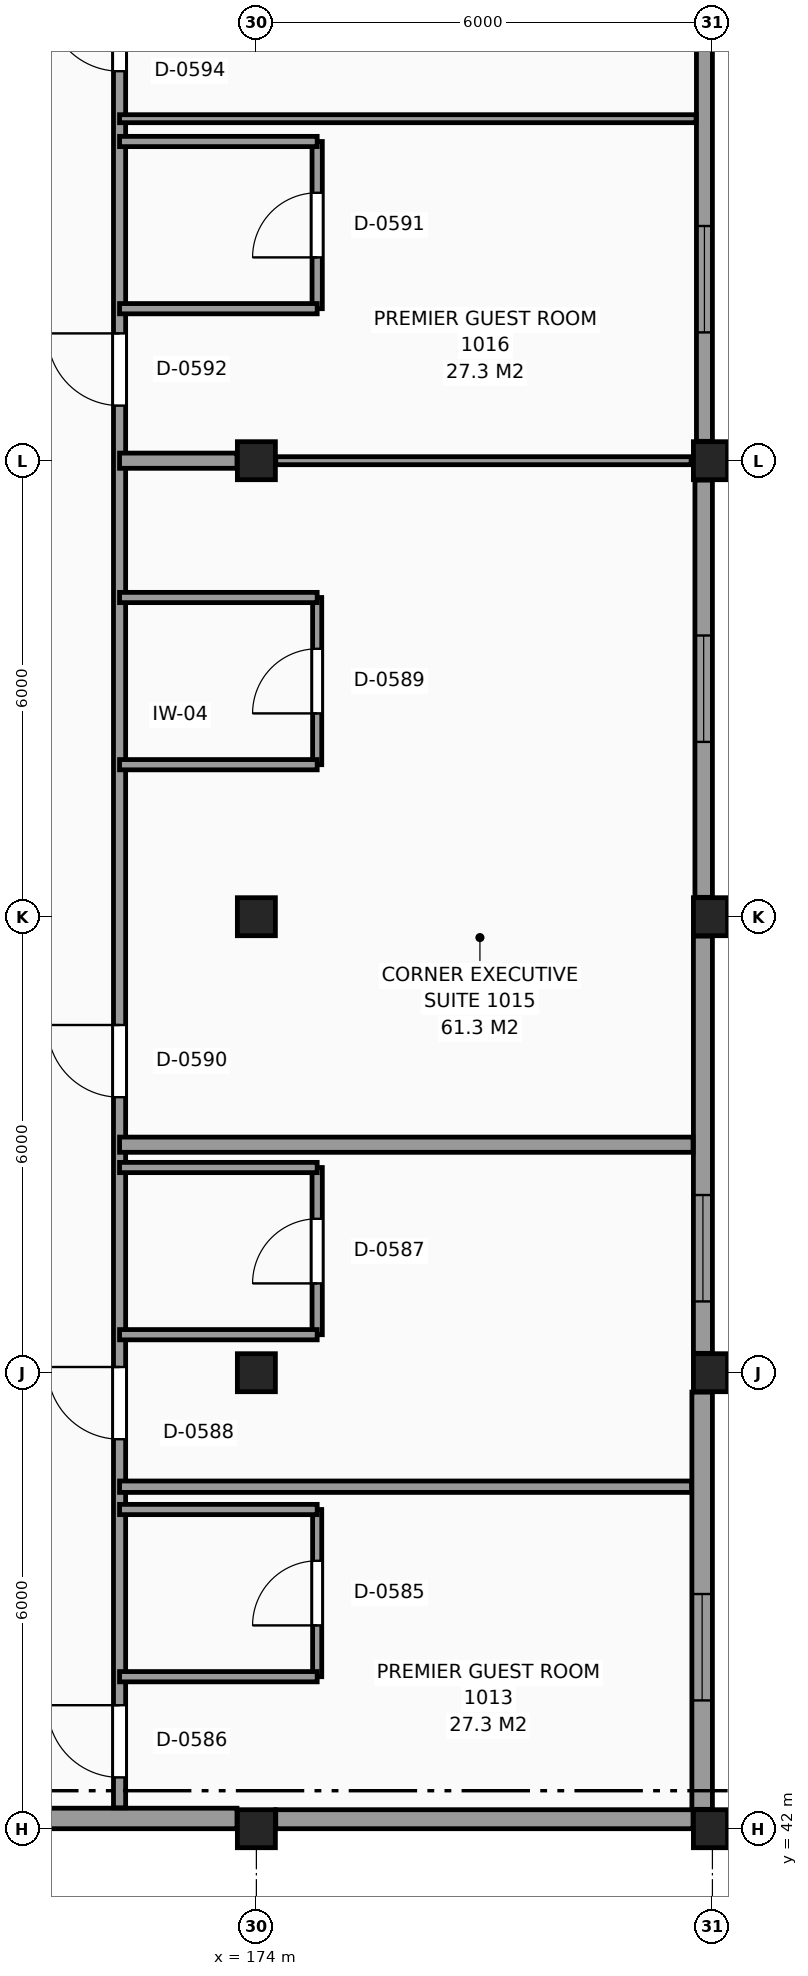
"""IFC4 building model, lengths in metres.
Left out: names, types, materials, properties, quantities, classifications, styles, units other than length and angle.
Written with IfcOpenShell. Run it as: python <this file> out.ifc"""

import sys

from ifc_helpers import new_model, si_unit, direction, frame, frame_2d, origin, origin_2d, place, context, subcontext, project, spatial, rectangle, extrude, element, fill, save


model = new_model("IFC4")
c1 = context("Model", 3, precision=1e-05, world=origin(), true_north=direction((0.0, 1.0)))
c2 = subcontext(c1, "Body", "Model", "MODEL_VIEW")
j1 = project(units=[si_unit("LENGTHUNIT", "METRE"), si_unit("PLANEANGLEUNIT", "RADIAN")], contexts=[c1])
p1 = place(None, origin())
s1 = spatial("IfcSite", under=j1, at=p1, CompositionType="ELEMENT")
p2 = place(p1, origin())
s2 = spatial("IfcBuilding", under=s1, at=p2, CompositionType="ELEMENT")
p3 = place(p2, frame((0.0, 0.0, 41.4)))
s3 = spatial("IfcBuildingStorey", under=s2, at=p3, CompositionType="ELEMENT", Elevation=41.4)
for number, where, z_axis, x_axis in (
    (1, (174.0, 42.0, 0.0), (0.0, 0.0, 1.0), (1.0, 0.0, 0.0)),
    (2, (174.0, 48.0, 0.0), (0.0, 0.0, 1.0), (1.0, 0.0, 0.0)),
    (3, (174.0, 54.0, 0.0), (0.0, 0.0, 1.0), (1.0, 0.0, 0.0)),
    (4, (174.0, 60.0, 0.0), (0.0, 0.0, 1.0), (1.0, 0.0, 0.0)),
    (5, (180.0, 42.0, 0.0), (0.0, 0.0, 1.0), (1.0, 0.0, 0.0)),
    (6, (180.0, 48.0, 0.0), (0.0, 0.0, 1.0), (1.0, 0.0, 0.0)),
    (7, (180.0, 54.0, 0.0), (0.0, 0.0, 1.0), (1.0, 0.0, 0.0)),
    (8, (180.0, 60.0, 0.0), (0.0, 0.0, 1.0), (1.0, 0.0, 0.0)),
):
    element("IfcColumn", number, at=place(p3, frame(where, z_axis=z_axis, x_axis=x_axis)), inside=s3, PredefinedType="COLUMN", context=c2, shape_type="SweptSolid", body=[
        extrude(rectangle(XDim=0.5, YDim=0.5, at=origin_2d()), origin(), (0.0, 0.0, 1.0), 3.3),
    ])
p4 = place(p3, frame((179.865, 42.255, 0.0), z_axis=(0.0, 0.0, 1.0), x_axis=(0.0, 1.0, 0.0)))
e9 = element("IfcWall", 9, at=p4, inside=s3, PredefinedType="SOLIDWALL", context=c2, shape_type="SweptSolid", body=[
    extrude(rectangle(XDim=5.49, YDim=0.27, at=frame_2d((2.745, 0.0))), origin(), (0.0, 0.0, 1.0), 2.445),
])
p5 = place(p4, frame((1.433, 0.0, 0.8)))
e10 = element("IfcOpeningElement", 10, at=p5, cuts=e9, PredefinedType="OPENING", context=c2, shape_type="SweptSolid", body=[
    extrude(rectangle(XDim=1.4, YDim=1.4, at=frame_2d((0.7, 0.7))), frame((0.0, 0.145, 0.0), z_axis=(0.0, -1.0, 0.0), x_axis=(1.0, 0.0, 0.0)), (0.0, 0.0, 1.0), 0.29),
])
p6 = place(p3, frame((179.875, 48.255, 0.0), z_axis=(0.0, 0.0, 1.0), x_axis=(0.0, 1.0, 0.0)))
e11 = element("IfcWall", 11, at=p6, inside=s3, PredefinedType="SOLIDWALL", context=c2, shape_type="SweptSolid", body=[
    extrude(rectangle(XDim=5.49, YDim=0.25, at=frame_2d((2.745, 0.0))), origin(), (0.0, 0.0, 1.0), 2.445),
])
p7 = place(p6, frame((0.683, 0.0, 0.8)))
e12 = element("IfcOpeningElement", 12, at=p7, cuts=e11, PredefinedType="OPENING", context=c2, shape_type="SweptSolid", body=[
    extrude(rectangle(XDim=1.4, YDim=1.4, at=frame_2d((0.7, 0.7))), frame((0.0, 0.135, 0.0), z_axis=(0.0, -1.0, 0.0), x_axis=(1.0, 0.0, 0.0)), (0.0, 0.0, 1.0), 0.27),
])
p8 = place(p3, frame((179.885, 54.255, 0.0), z_axis=(0.0, 0.0, 1.0), x_axis=(0.0, 1.0, 0.0)))
e13 = element("IfcWall", 13, at=p8, inside=s3, PredefinedType="SOLIDWALL", context=c2, shape_type="SweptSolid", body=[
    extrude(rectangle(XDim=5.49, YDim=0.23, at=frame_2d((2.745, 0.0))), origin(), (0.0, 0.0, 1.0), 2.445),
])
p9 = place(p8, frame((2.045, 0.0, 0.8)))
e14 = element("IfcOpeningElement", 14, at=p9, cuts=e13, PredefinedType="OPENING", context=c2, shape_type="SweptSolid", body=[
    extrude(rectangle(XDim=1.4, YDim=1.4, at=frame_2d((0.7, 0.7))), frame((0.0, 0.125, 0.0), z_axis=(0.0, -1.0, 0.0), x_axis=(1.0, 0.0, 0.0)), (0.0, 0.0, 1.0), 0.25),
])
p10 = place(p3, frame((179.895, 60.255, 0.0), z_axis=(0.0, 0.0, 1.0), x_axis=(0.0, 1.0, 0.0)))
e15 = element("IfcWall", 15, at=p10, inside=s3, PredefinedType="SOLIDWALL", context=c2, shape_type="SweptSolid", body=[
    extrude(rectangle(XDim=5.49, YDim=0.21, at=frame_2d((2.745, 0.0))), origin(), (0.0, 0.0, 1.0), 2.445),
])
p11 = place(p10, frame((1.433, 0.0, 0.8)))
e16 = element("IfcOpeningElement", 16, at=p11, cuts=e15, PredefinedType="OPENING", context=c2, shape_type="SweptSolid", body=[
    extrude(rectangle(XDim=1.4, YDim=1.4, at=frame_2d((0.7, 0.7))), frame((0.0, 0.115, 0.0), z_axis=(0.0, -1.0, 0.0), x_axis=(1.0, 0.0, 0.0)), (0.0, 0.0, 1.0), 0.23),
])
p12 = place(p3, frame((168.255, 42.135, 0.0), z_axis=(0.0, 0.0, 1.0), x_axis=(1.0, 0.0, 0.0)))
e17 = element("IfcWall", 17, at=p12, inside=s3, PredefinedType="SOLIDWALL", context=c2, shape_type="SweptSolid", body=[
    extrude(rectangle(XDim=5.49, YDim=0.27, at=frame_2d((2.745, 0.0))), origin(), (0.0, 0.0, 1.0), 2.295),
])
p13 = place(p3, frame((174.255, 42.125, 0.0), z_axis=(0.0, 0.0, 1.0), x_axis=(1.0, 0.0, 0.0)))
e18 = element("IfcWall", 18, at=p13, inside=s3, PredefinedType="SOLIDWALL", context=c2, shape_type="SweptSolid", body=[
    extrude(rectangle(XDim=5.49, YDim=0.25, at=frame_2d((2.745, 0.0))), origin(), (0.0, 0.0, 1.0), 2.295),
])
p14 = place(p3, frame((172.2, 42.275, 0.0), z_axis=(0.0, 0.0, 1.0), x_axis=(0.0, 1.0, 0.0)))
e19 = element("IfcWall", 19, at=p14, inside=s3, PredefinedType="PARTITIONING", context=c2, shape_type="SweptSolid", body=[
    extrude(rectangle(XDim=65.545, YDim=0.16, at=frame_2d((32.772, 0.0))), origin(), (0.0, 0.0, 1.0), 3.06),
])
p15 = place(p14, frame((0.4, 0.0, 0.0)))
e20 = element("IfcOpeningElement", 20, at=p15, cuts=e19, PredefinedType="OPENING", context=c2, shape_type="SweptSolid", body=[
    extrude(rectangle(XDim=0.95, YDim=2.1, at=frame_2d((0.475, 1.05))), frame((0.0, 0.09, 0.0), z_axis=(0.0, -1.0, 0.0), x_axis=(1.0, 0.0, 0.0)), (0.0, 0.0, 1.0), 0.18),
])
p16 = place(p14, frame((4.85, 0.0, 0.0)))
e21 = element("IfcOpeningElement", 21, at=p16, cuts=e19, PredefinedType="OPENING", context=c2, shape_type="SweptSolid", body=[
    extrude(rectangle(XDim=0.95, YDim=2.1, at=frame_2d((0.475, 1.05))), frame((0.0, 0.09, 0.0), z_axis=(0.0, -1.0, 0.0), x_axis=(1.0, 0.0, 0.0)), (0.0, 0.0, 1.0), 0.18),
])
p17 = place(p14, frame((9.35, 0.0, 0.0)))
e22 = element("IfcOpeningElement", 22, at=p17, cuts=e19, PredefinedType="OPENING", context=c2, shape_type="SweptSolid", body=[
    extrude(rectangle(XDim=0.95, YDim=2.1, at=frame_2d((0.475, 1.05))), frame((0.0, 0.09, 0.0), z_axis=(0.0, -1.0, 0.0), x_axis=(1.0, 0.0, 0.0)), (0.0, 0.0, 1.0), 0.18),
])
p18 = place(p14, frame((18.45, 0.0, 0.0)))
e23 = element("IfcOpeningElement", 23, at=p18, cuts=e19, PredefinedType="OPENING", context=c2, shape_type="SweptSolid", body=[
    extrude(rectangle(XDim=0.95, YDim=2.1, at=frame_2d((0.475, 1.05))), frame((0.0, 0.09, 0.0), z_axis=(0.0, -1.0, 0.0), x_axis=(1.0, 0.0, 0.0)), (0.0, 0.0, 1.0), 0.18),
])
p19 = place(p14, frame((22.85, 0.0, 0.0)))
e24 = element("IfcOpeningElement", 24, at=p19, cuts=e19, PredefinedType="OPENING", context=c2, shape_type="SweptSolid", body=[
    extrude(rectangle(XDim=0.95, YDim=2.1, at=frame_2d((0.475, 1.05))), frame((0.0, 0.09, 0.0), z_axis=(0.0, -1.0, 0.0), x_axis=(1.0, 0.0, 0.0)), (0.0, 0.0, 1.0), 0.18),
])
p20 = place(p14, frame((30.05, 0.0, 0.0)))
e25 = element("IfcOpeningElement", 25, at=p20, cuts=e19, PredefinedType="OPENING", context=c2, shape_type="SweptSolid", body=[
    extrude(rectangle(XDim=0.95, YDim=2.1, at=frame_2d((0.475, 1.05))), frame((0.0, 0.09, 0.0), z_axis=(0.0, -1.0, 0.0), x_axis=(1.0, 0.0, 0.0)), (0.0, 0.0, 1.0), 0.18),
])
p21 = place(p14, frame((38.3, 0.0, 0.0)))
e26 = element("IfcOpeningElement", 26, at=p21, cuts=e19, PredefinedType="OPENING", context=c2, shape_type="SweptSolid", body=[
    extrude(rectangle(XDim=0.95, YDim=2.1, at=frame_2d((0.475, 1.05))), frame((0.0, 0.09, 0.0), z_axis=(0.0, -1.0, 0.0), x_axis=(1.0, 0.0, 0.0)), (0.0, 0.0, 1.0), 0.18),
])
p22 = place(p14, frame((40.85, 0.0, 0.0)))
e27 = element("IfcOpeningElement", 27, at=p22, cuts=e19, PredefinedType="OPENING", context=c2, shape_type="SweptSolid", body=[
    extrude(rectangle(XDim=0.95, YDim=2.1, at=frame_2d((0.475, 1.05))), frame((0.0, 0.09, 0.0), z_axis=(0.0, -1.0, 0.0), x_axis=(1.0, 0.0, 0.0)), (0.0, 0.0, 1.0), 0.18),
])
p23 = place(p14, frame((48.05, 0.0, 0.0)))
e28 = element("IfcOpeningElement", 28, at=p23, cuts=e19, PredefinedType="OPENING", context=c2, shape_type="SweptSolid", body=[
    extrude(rectangle(XDim=0.95, YDim=2.1, at=frame_2d((0.475, 1.05))), frame((0.0, 0.09, 0.0), z_axis=(0.0, -1.0, 0.0), x_axis=(1.0, 0.0, 0.0)), (0.0, 0.0, 1.0), 0.18),
])
p24 = place(p14, frame((52.25, 0.0, 0.0)))
e29 = element("IfcOpeningElement", 29, at=p24, cuts=e19, PredefinedType="OPENING", context=c2, shape_type="SweptSolid", body=[
    extrude(rectangle(XDim=0.95, YDim=2.1, at=frame_2d((0.475, 1.05))), frame((0.0, 0.09, 0.0), z_axis=(0.0, -1.0, 0.0), x_axis=(1.0, 0.0, 0.0)), (0.0, 0.0, 1.0), 0.18),
])
p25 = place(p14, frame((54.45, 0.0, 0.0)))
e30 = element("IfcOpeningElement", 30, at=p25, cuts=e19, PredefinedType="OPENING", context=c2, shape_type="SweptSolid", body=[
    extrude(rectangle(XDim=0.95, YDim=2.1, at=frame_2d((0.475, 1.05))), frame((0.0, 0.09, 0.0), z_axis=(0.0, -1.0, 0.0), x_axis=(1.0, 0.0, 0.0)), (0.0, 0.0, 1.0), 0.18),
])
p26 = place(p14, frame((60.45, 0.0, 0.0)))
e31 = element("IfcOpeningElement", 31, at=p26, cuts=e19, PredefinedType="OPENING", context=c2, shape_type="SweptSolid", body=[
    extrude(rectangle(XDim=0.95, YDim=2.1, at=frame_2d((0.475, 1.05))), frame((0.0, 0.09, 0.0), z_axis=(0.0, -1.0, 0.0), x_axis=(1.0, 0.0, 0.0)), (0.0, 0.0, 1.0), 0.18),
])
p27 = place(p3, frame((174.8, 44.0, 0.0), z_axis=(0.0, 0.0, 1.0), x_axis=(0.0, 1.0, 0.0)))
e32 = element("IfcWall", 32, at=p27, inside=s3, PredefinedType="PARTITIONING", context=c2, shape_type="SweptSolid", body=[
    extrude(rectangle(XDim=2.2, YDim=0.12, at=frame_2d((1.1, 0.0))), origin(), (0.0, 0.0, 1.0), 3.06),
])
p28 = place(p27, frame((0.675, 0.0, 0.0)))
e33 = element("IfcOpeningElement", 33, at=p28, cuts=e32, PredefinedType="OPENING", context=c2, shape_type="SweptSolid", body=[
    extrude(rectangle(XDim=0.85, YDim=2.1, at=frame_2d((0.425, 1.05))), frame((0.0, 0.07, 0.0), z_axis=(0.0, -1.0, 0.0), x_axis=(1.0, 0.0, 0.0)), (0.0, 0.0, 1.0), 0.14),
])
p29 = place(p3, frame((174.8, 48.5, 0.0), z_axis=(0.0, 0.0, 1.0), x_axis=(0.0, 1.0, 0.0)))
e34 = element("IfcWall", 34, at=p29, inside=s3, PredefinedType="PARTITIONING", context=c2, shape_type="SweptSolid", body=[
    extrude(rectangle(XDim=2.2, YDim=0.135, at=frame_2d((1.1, 0.0))), origin(), (0.0, 0.0, 1.0), 3.06),
])
p30 = place(p29, frame((0.675, 0.0, 0.0)))
e35 = element("IfcOpeningElement", 35, at=p30, cuts=e34, PredefinedType="OPENING", context=c2, shape_type="SweptSolid", body=[
    extrude(rectangle(XDim=0.85, YDim=2.1, at=frame_2d((0.425, 1.05))), frame((0.0, 0.078, 0.0), z_axis=(0.0, -1.0, 0.0), x_axis=(1.0, 0.0, 0.0)), (0.0, 0.0, 1.0), 0.155),
])
p31 = place(p3, frame((174.8, 56.0, 0.0), z_axis=(0.0, 0.0, 1.0), x_axis=(0.0, 1.0, 0.0)))
e36 = element("IfcWall", 36, at=p31, inside=s3, PredefinedType="PARTITIONING", context=c2, shape_type="SweptSolid", body=[
    extrude(rectangle(XDim=2.2, YDim=0.12, at=frame_2d((1.1, 0.0))), origin(), (0.0, 0.0, 1.0), 3.06),
])
p32 = place(p31, frame((0.675, 0.0, 0.0)))
e37 = element("IfcOpeningElement", 37, at=p32, cuts=e36, PredefinedType="OPENING", context=c2, shape_type="SweptSolid", body=[
    extrude(rectangle(XDim=0.85, YDim=2.1, at=frame_2d((0.425, 1.05))), frame((0.0, 0.07, 0.0), z_axis=(0.0, -1.0, 0.0), x_axis=(1.0, 0.0, 0.0)), (0.0, 0.0, 1.0), 0.14),
])
p33 = place(p3, frame((174.8, 62.0, 0.0), z_axis=(0.0, 0.0, 1.0), x_axis=(0.0, 1.0, 0.0)))
e38 = element("IfcWall", 38, at=p33, inside=s3, PredefinedType="PARTITIONING", context=c2, shape_type="SweptSolid", body=[
    extrude(rectangle(XDim=2.2, YDim=0.135, at=frame_2d((1.1, 0.0))), origin(), (0.0, 0.0, 1.0), 3.06),
])
p34 = place(p33, frame((0.675, 0.0, 0.0)))
e39 = element("IfcOpeningElement", 39, at=p34, cuts=e38, PredefinedType="OPENING", context=c2, shape_type="SweptSolid", body=[
    extrude(rectangle(XDim=0.85, YDim=2.1, at=frame_2d((0.425, 1.05))), frame((0.0, 0.078, 0.0), z_axis=(0.0, -1.0, 0.0), x_axis=(1.0, 0.0, 0.0)), (0.0, 0.0, 1.0), 0.155),
])
for number, where, z_axis, x_axis in (
    (40, (172.2, 44.0, 0.0), (0.0, 0.0, 1.0), (1.0, 0.0, 0.0)),
    (41, (172.2, 46.2, 0.0), (0.0, 0.0, 1.0), (1.0, 0.0, 0.0)),
):
    element("IfcWall", number, at=place(p3, frame(where, z_axis=z_axis, x_axis=x_axis)), inside=s3, PredefinedType="PARTITIONING", context=c2, shape_type="SweptSolid", body=[
        extrude(rectangle(XDim=2.6, YDim=0.135, at=frame_2d((1.3, 0.0))), origin(), (0.0, 0.0, 1.0), 3.06),
    ])
p35 = place(p3, frame((172.2, 46.5, 0.0), z_axis=(0.0, 0.0, 1.0), x_axis=(1.0, 0.0, 0.0)))
e42 = element("IfcWall", 42, at=p35, inside=s3, PredefinedType="PARTITIONING", context=c2, shape_type="SweptSolid", body=[
    extrude(rectangle(XDim=7.525, YDim=0.15, at=frame_2d((3.763, 0.0))), origin(), (0.0, 0.0, 1.0), 3.06),
])
for number, where, z_axis, x_axis in (
    (43, (172.2, 48.5, 0.0), (0.0, 0.0, 1.0), (1.0, 0.0, 0.0)),
    (44, (172.2, 50.7, 0.0), (0.0, 0.0, 1.0), (1.0, 0.0, 0.0)),
):
    element("IfcWall", number, at=place(p3, frame(where, z_axis=z_axis, x_axis=x_axis)), inside=s3, PredefinedType="PARTITIONING", context=c2, shape_type="SweptSolid", body=[
        extrude(rectangle(XDim=2.6, YDim=0.135, at=frame_2d((1.3, 0.0))), origin(), (0.0, 0.0, 1.0), 3.06),
    ])
p36 = place(p3, frame((172.2, 51.0, 0.0), z_axis=(0.0, 0.0, 1.0), x_axis=(1.0, 0.0, 0.0)))
e45 = element("IfcWall", 45, at=p36, inside=s3, PredefinedType="PARTITIONING", context=c2, shape_type="SweptSolid", body=[
    extrude(rectangle(XDim=7.545, YDim=0.2, at=frame_2d((3.772, 0.0))), origin(), (0.0, 0.0, 1.0), 3.06),
])
for number, where, z_axis, x_axis in (
    (46, (172.2, 56.0, 0.0), (0.0, 0.0, 1.0), (1.0, 0.0, 0.0)),
    (47, (172.2, 58.2, 0.0), (0.0, 0.0, 1.0), (1.0, 0.0, 0.0)),
):
    element("IfcWall", number, at=place(p3, frame(where, z_axis=z_axis, x_axis=x_axis)), inside=s3, PredefinedType="PARTITIONING", context=c2, shape_type="SweptSolid", body=[
        extrude(rectangle(XDim=2.6, YDim=0.135, at=frame_2d((1.3, 0.0))), origin(), (0.0, 0.0, 1.0), 3.06),
    ])
p37 = place(p3, frame((172.2, 60.0, 0.0), z_axis=(0.0, 0.0, 1.0), x_axis=(1.0, 0.0, 0.0)))
e48 = element("IfcWall", 48, at=p37, inside=s3, PredefinedType="PARTITIONING", context=c2, shape_type="SweptSolid", body=[
    extrude(rectangle(XDim=1.545, YDim=0.2, at=frame_2d((0.772, 0.0))), origin(), (0.0, 0.0, 1.0), 2.295),
])
p38 = place(p3, frame((174.255, 60.0, 0.0), z_axis=(0.0, 0.0, 1.0), x_axis=(1.0, 0.0, 0.0)))
e49 = element("IfcWall", 49, at=p38, inside=s3, PredefinedType="PARTITIONING", context=c2, shape_type="SweptSolid", body=[
    extrude(rectangle(XDim=5.465, YDim=0.105, at=frame_2d((2.732, 0.0))), origin(), (0.0, 0.0, 1.0), 2.295),
])
for number, where, z_axis, x_axis in (
    (50, (172.2, 62.0, 0.0), (0.0, 0.0, 1.0), (1.0, 0.0, 0.0)),
    (51, (172.2, 64.2, 0.0), (0.0, 0.0, 1.0), (1.0, 0.0, 0.0)),
):
    element("IfcWall", number, at=place(p3, frame(where, z_axis=z_axis, x_axis=x_axis)), inside=s3, PredefinedType="PARTITIONING", context=c2, shape_type="SweptSolid", body=[
        extrude(rectangle(XDim=2.6, YDim=0.135, at=frame_2d((1.3, 0.0))), origin(), (0.0, 0.0, 1.0), 3.06),
    ])
p39 = place(p3, frame((172.2, 64.5, 0.0), z_axis=(0.0, 0.0, 1.0), x_axis=(1.0, 0.0, 0.0)))
e52 = element("IfcWall", 52, at=p39, inside=s3, PredefinedType="PARTITIONING", context=c2, shape_type="SweptSolid", body=[
    extrude(rectangle(XDim=7.585, YDim=0.105, at=frame_2d((3.792, 0.0))), origin(), (0.0, 0.0, 1.0), 3.06),
])
p40 = place(p5, origin())
e53 = element("IfcWindow", 53, at=p40, inside=s3, PartitioningType="SINGLE_PANEL", PredefinedType="WINDOW", context=c2, shape_type="SweptSolid", body=[
    extrude(rectangle(XDim=1.4, YDim=1.4, at=frame_2d((0.7, 0.7))), frame((0.0, 0.03, 0.0), z_axis=(0.0, -1.0, 0.0), x_axis=(1.0, 0.0, 0.0)), (0.0, 0.0, 1.0), 0.06),
])
fill(e10, e53)
p41 = place(p7, origin())
e54 = element("IfcWindow", 54, at=p41, inside=s3, PartitioningType="SINGLE_PANEL", PredefinedType="WINDOW", context=c2, shape_type="SweptSolid", body=[
    extrude(rectangle(XDim=1.4, YDim=1.4, at=frame_2d((0.7, 0.7))), frame((0.0, 0.03, 0.0), z_axis=(0.0, -1.0, 0.0), x_axis=(1.0, 0.0, 0.0)), (0.0, 0.0, 1.0), 0.06),
])
fill(e12, e54)
p42 = place(p9, origin())
e55 = element("IfcWindow", 55, at=p42, inside=s3, PartitioningType="SINGLE_PANEL", PredefinedType="WINDOW", context=c2, shape_type="SweptSolid", body=[
    extrude(rectangle(XDim=1.4, YDim=1.4, at=frame_2d((0.7, 0.7))), frame((0.0, 0.03, 0.0), z_axis=(0.0, -1.0, 0.0), x_axis=(1.0, 0.0, 0.0)), (0.0, 0.0, 1.0), 0.06),
])
fill(e14, e55)
p43 = place(p11, origin())
e56 = element("IfcWindow", 56, at=p43, inside=s3, PartitioningType="SINGLE_PANEL", PredefinedType="WINDOW", context=c2, shape_type="SweptSolid", body=[
    extrude(rectangle(XDim=1.4, YDim=1.4, at=frame_2d((0.7, 0.7))), frame((0.0, 0.03, 0.0), z_axis=(0.0, -1.0, 0.0), x_axis=(1.0, 0.0, 0.0)), (0.0, 0.0, 1.0), 0.06),
])
fill(e16, e56)
p44 = place(p28, origin())
e57 = element("IfcDoor", 57, at=p44, inside=s3, OperationType="SINGLE_SWING_LEFT", PredefinedType="DOOR", context=c2, shape_type="SweptSolid", body=[
    extrude(rectangle(XDim=0.85, YDim=2.1, at=frame_2d((0.425, 1.05))), frame((0.0, 0.025, 0.0), z_axis=(0.0, -1.0, 0.0), x_axis=(1.0, 0.0, 0.0)), (0.0, 0.0, 1.0), 0.05),
])
fill(e33, e57)
p45 = place(p15, origin())
e58 = element("IfcDoor", 58, at=p45, inside=s3, OperationType="SINGLE_SWING_RIGHT", PredefinedType="DOOR", context=c2, shape_type="SweptSolid", body=[
    extrude(rectangle(XDim=0.95, YDim=2.1, at=frame_2d((0.475, 1.05))), frame((0.0, 0.025, 0.0), z_axis=(0.0, -1.0, 0.0), x_axis=(1.0, 0.0, 0.0)), (0.0, 0.0, 1.0), 0.05),
])
fill(e20, e58)
p46 = place(p30, origin())
e59 = element("IfcDoor", 59, at=p46, inside=s3, OperationType="SINGLE_SWING_LEFT", PredefinedType="DOOR", context=c2, shape_type="SweptSolid", body=[
    extrude(rectangle(XDim=0.85, YDim=2.1, at=frame_2d((0.425, 1.05))), frame((0.0, 0.025, 0.0), z_axis=(0.0, -1.0, 0.0), x_axis=(1.0, 0.0, 0.0)), (0.0, 0.0, 1.0), 0.05),
])
fill(e35, e59)
p47 = place(p16, origin())
e60 = element("IfcDoor", 60, at=p47, inside=s3, OperationType="SINGLE_SWING_RIGHT", PredefinedType="DOOR", context=c2, shape_type="SweptSolid", body=[
    extrude(rectangle(XDim=0.95, YDim=2.1, at=frame_2d((0.475, 1.05))), frame((0.0, 0.025, 0.0), z_axis=(0.0, -1.0, 0.0), x_axis=(1.0, 0.0, 0.0)), (0.0, 0.0, 1.0), 0.05),
])
fill(e21, e60)
p48 = place(p32, origin())
e61 = element("IfcDoor", 61, at=p48, inside=s3, OperationType="SINGLE_SWING_LEFT", PredefinedType="DOOR", context=c2, shape_type="SweptSolid", body=[
    extrude(rectangle(XDim=0.85, YDim=2.1, at=frame_2d((0.425, 1.05))), frame((0.0, 0.025, 0.0), z_axis=(0.0, -1.0, 0.0), x_axis=(1.0, 0.0, 0.0)), (0.0, 0.0, 1.0), 0.05),
])
fill(e37, e61)
p49 = place(p17, origin())
e62 = element("IfcDoor", 62, at=p49, inside=s3, OperationType="SINGLE_SWING_RIGHT", PredefinedType="DOOR", context=c2, shape_type="SweptSolid", body=[
    extrude(rectangle(XDim=0.95, YDim=2.1, at=frame_2d((0.475, 1.05))), frame((0.0, 0.025, 0.0), z_axis=(0.0, -1.0, 0.0), x_axis=(1.0, 0.0, 0.0)), (0.0, 0.0, 1.0), 0.05),
])
fill(e22, e62)
p50 = place(p34, origin())
e63 = element("IfcDoor", 63, at=p50, inside=s3, OperationType="SINGLE_SWING_LEFT", PredefinedType="DOOR", context=c2, shape_type="SweptSolid", body=[
    extrude(rectangle(XDim=0.85, YDim=2.1, at=frame_2d((0.425, 1.05))), frame((0.0, 0.025, 0.0), z_axis=(0.0, -1.0, 0.0), x_axis=(1.0, 0.0, 0.0)), (0.0, 0.0, 1.0), 0.05),
])
fill(e39, e63)
p51 = place(p18, origin())
e64 = element("IfcDoor", 64, at=p51, inside=s3, OperationType="SINGLE_SWING_RIGHT", PredefinedType="DOOR", context=c2, shape_type="SweptSolid", body=[
    extrude(rectangle(XDim=0.95, YDim=2.1, at=frame_2d((0.475, 1.05))), frame((0.0, 0.025, 0.0), z_axis=(0.0, -1.0, 0.0), x_axis=(1.0, 0.0, 0.0)), (0.0, 0.0, 1.0), 0.05),
])
fill(e23, e64)
p52 = place(p19, origin())
e65 = element("IfcDoor", 65, at=p52, inside=s3, OperationType="SINGLE_SWING_RIGHT", PredefinedType="DOOR", context=c2, shape_type="SweptSolid", body=[
    extrude(rectangle(XDim=0.95, YDim=2.1, at=frame_2d((0.475, 1.05))), frame((0.0, 0.025, 0.0), z_axis=(0.0, -1.0, 0.0), x_axis=(1.0, 0.0, 0.0)), (0.0, 0.0, 1.0), 0.05),
])
fill(e24, e65)
save(model, sys.argv[1])
